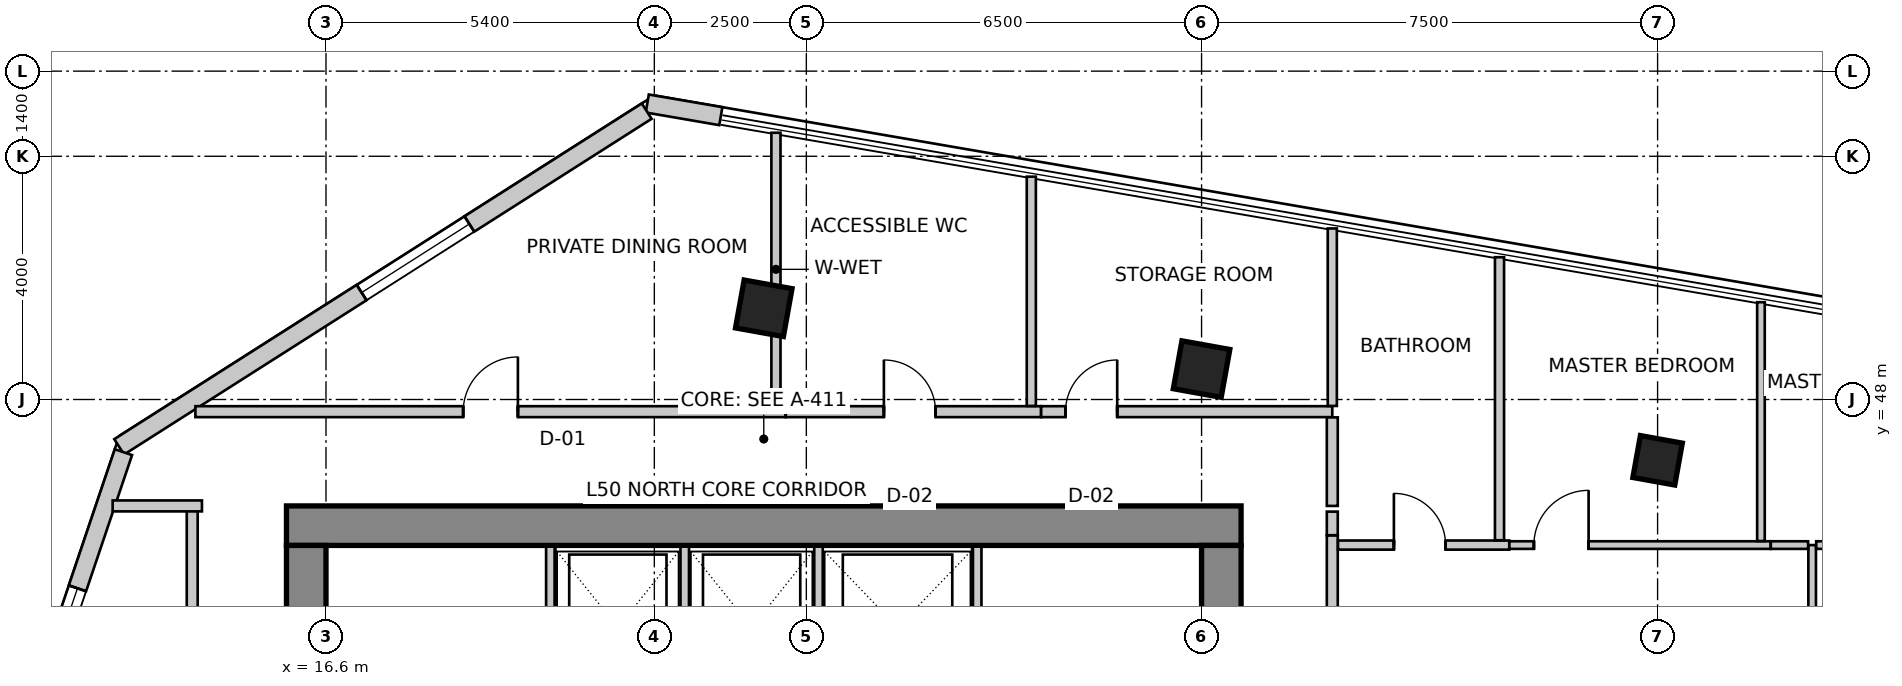
"""IFC4 building model, lengths in metres.
Left out: names, types, materials, properties, quantities, classifications, styles, units other than length and angle.
Written with IfcOpenShell. Run it as: python <this file> out.ifc"""

import sys

from ifc_helpers import new_model, si_unit, direction, frame, frame_2d, origin, origin_2d, place, context, subcontext, project, spatial, rectangle, extrude, source, transform, mapped, element, fill, save


model = new_model("IFC4")
c1 = context("Model", 3, precision=1e-05, world=origin(), true_north=direction((0.0, 1.0)))
c2 = subcontext(c1, "Body", "Model", "MODEL_VIEW")
j1 = project(units=[si_unit("LENGTHUNIT", "METRE"), si_unit("PLANEANGLEUNIT", "RADIAN")], contexts=[c1])
p1 = place(None, origin())
s1 = spatial("IfcSite", under=j1, at=p1, CompositionType="ELEMENT")
p2 = place(p1, origin())
s2 = spatial("IfcBuilding", under=s1, at=p2, CompositionType="ELEMENT")
p3 = place(p2, frame((0.0, 0.0, 200.9)))
s3 = spatial("IfcBuildingStorey", under=s2, at=p3, CompositionType="ELEMENT", Elevation=200.9)
p4 = place(p3, frame((15.95, 45.925, 0.0), z_axis=(0.0, 0.0, 1.0), x_axis=(1.0, 0.0, 0.0)))
e1 = element("IfcWall", 1, at=p4, inside=s3, PredefinedType="SHEAR", context=c2, shape_type="SweptSolid", body=[
    extrude(rectangle(XDim=15.7, YDim=0.65, at=frame_2d((7.85, 0.0))), origin(), (0.0, 0.0, 1.0), 3.5),
])
p5 = place(p3, frame((16.275, 34.2, 0.0), z_axis=(0.0, 0.0, 1.0), x_axis=(0.0, 1.0, 0.0)))
e2 = element("IfcWall", 2, at=p5, inside=s3, PredefinedType="SHEAR", context=c2, shape_type="SweptSolid", body=[
    extrude(rectangle(XDim=11.4, YDim=0.65, at=frame_2d((5.7, 0.0))), origin(), (0.0, 0.0, 1.0), 3.5),
])
m1 = source(origin(), c2, "Body", "SweptSolid", [
    extrude(rectangle(XDim=1.1, YDim=2.15, at=frame_2d((0.55, 1.075))), frame((0.0, 0.335, 0.0), z_axis=(0.0, -1.0, 0.0), x_axis=(1.0, 0.0, 0.0)), (0.0, 0.0, 1.0), 0.67),
])
p6 = place(p5, frame((7.15, 0.0, 0.0)))
e3 = element("IfcOpeningElement", 3, at=p6, cuts=e2, PredefinedType="OPENING", context=c2, shape_type="MappedRepresentation", body=[
    mapped(m1, transform((0.0, 0.0, 0.0), scale=1.0)),
])
p7 = place(p3, frame((31.325, 34.2, 0.0), z_axis=(0.0, 0.0, 1.0), x_axis=(0.0, 1.0, 0.0)))
e4 = element("IfcWall", 4, at=p7, inside=s3, PredefinedType="SHEAR", context=c2, shape_type="SweptSolid", body=[
    extrude(rectangle(XDim=11.4, YDim=0.65, at=frame_2d((5.7, 0.0))), origin(), (0.0, 0.0, 1.0), 3.5),
])
p8 = place(p7, frame((7.35, 0.0, 0.0)))
e5 = element("IfcOpeningElement", 5, at=p8, cuts=e4, PredefinedType="OPENING", context=c2, shape_type="MappedRepresentation", body=[
    mapped(m1, transform((0.0, 0.0, 0.0), scale=1.0)),
])
m2 = source(origin(), c2, "Body", "SweptSolid", [
    extrude(rectangle(XDim=0.8, YDim=0.8, at=origin_2d()), origin(), (0.0, 0.0, 1.0), 3.5),
])
for number, where, z_axis, x_axis in (
    (6, (23.8, 49.5, 0.0), (0.0, 0.0, 1.0), (0.984, -0.177, 0.0)),
    (7, (31.0, 48.5, 0.0), (0.0, 0.0, 1.0), (0.984, -0.177, 0.0)),
):
    element("IfcColumn", number, at=place(p3, frame(where, z_axis=z_axis, x_axis=x_axis)), inside=s3, PredefinedType="COLUMN", context=c2, shape_type="MappedRepresentation", body=[
        mapped(m2, transform((0.0, 0.0, 0.0), scale=1.0)),
    ])
m3 = source(origin(), c2, "Body", "SweptSolid", [
    extrude(rectangle(XDim=0.7, YDim=0.7, at=origin_2d()), origin(), (0.0, 0.0, 1.0), 3.5),
])
p9 = place(p3, frame((38.5, 47.0, 0.0), z_axis=(0.0, 0.0, 1.0), x_axis=(0.984195607969, -0.17708474032, 0.0)))
e8 = element("IfcColumn", 8, at=p9, inside=s3, PredefinedType="COLUMN", context=c2, shape_type="MappedRepresentation", body=[
    mapped(m3, transform((0.0, 0.0, 0.0), scale=1.0)),
])
p10 = place(p3, frame((23.094, 52.66, 0.0), z_axis=(0.0, 0.0, 1.0), x_axis=(-0.985503719785, 0.169653818966, 0.0)))
e9 = element("IfcWall", 9, at=p10, inside=s3, PredefinedType="SOLIDWALL", context=c2, shape_type="SweptSolid", body=[
    extrude(rectangle(XDim=1.228, YDim=0.3, at=frame_2d((0.614, 0.0))), origin(), (0.0, 0.0, 1.0), 3.25),
])
p11 = place(p3, frame((21.875, 52.742, 0.0), z_axis=(0.0, 0.0, 1.0), x_axis=(-0.843666375448, -0.536867811419, 0.0)))
e10 = element("IfcWall", 10, at=p11, inside=s3, PredefinedType="SOLIDWALL", context=c2, shape_type="SweptSolid", body=[
    extrude(rectangle(XDim=10.284, YDim=0.3, at=frame_2d((5.142, 0.0))), origin(), (0.0, 0.0, 1.0), 3.25),
])
m4 = source(origin(), c2, "Body", "SweptSolid", [
    extrude(rectangle(XDim=2.1, YDim=2.0, at=frame_2d((1.05, 1.0))), frame((0.0, 0.16, 0.0), z_axis=(0.0, -1.0, 0.0), x_axis=(1.0, 0.0, 0.0)), (0.0, 0.0, 1.0), 0.32),
])
p12 = place(p11, frame((3.457, 0.0, 0.85)))
e11 = element("IfcOpeningElement", 11, at=p12, cuts=e10, PredefinedType="OPENING", context=c2, shape_type="MappedRepresentation", body=[
    mapped(m4, transform((0.0, 0.0, 0.0), scale=1.0)),
])
p13 = place(p3, frame((13.269, 47.134, 0.0), z_axis=(0.0, 0.0, 1.0), x_axis=(-0.319920776449, -0.947444297464, 0.0)))
e12 = element("IfcWall", 12, at=p13, inside=s3, PredefinedType="SOLIDWALL", context=c2, shape_type="SweptSolid", body=[
    extrude(rectangle(XDim=16.133, YDim=0.3, at=frame_2d((8.067, 0.0))), origin(), (0.0, 0.0, 1.0), 3.25),
])
m5 = source(origin(), c2, "Body", "SweptSolid", [
    extrude(rectangle(XDim=2.4, YDim=2.2, at=frame_2d((1.2, 1.1))), frame((0.0, 0.16, 0.0), z_axis=(0.0, -1.0, 0.0), x_axis=(1.0, 0.0, 0.0)), (0.0, 0.0, 1.0), 0.32),
])
p14 = place(p13, frame((2.363, 0.0, 0.85)))
e13 = element("IfcOpeningElement", 13, at=p14, cuts=e12, PredefinedType="OPENING", context=c2, shape_type="MappedRepresentation", body=[
    mapped(m5, transform((0.0, 0.0, 0.0), scale=1.0)),
])
p15 = place(p13, frame((7.41, 0.0, 0.85)))
e14 = element("IfcOpeningElement", 14, at=p15, cuts=e12, PredefinedType="OPENING", context=c2, shape_type="MappedRepresentation", body=[
    mapped(m4, transform((0.0, 0.0, 0.0), scale=1.0)),
])
p16 = place(p13, frame((12.157, 0.0, 0.85)))
e15 = element("IfcOpeningElement", 15, at=p16, cuts=e12, PredefinedType="OPENING", context=c2, shape_type="MappedRepresentation", body=[
    mapped(m5, transform((0.0, 0.0, 0.0), scale=1.0)),
])
for number, where, z_axis, x_axis in (
    (16, (20.29, 43.28, 0.0), (0.0, 0.0, 1.0), (0.0, 1.0, 0.0)),
    (17, (27.31, 43.28, 0.0), (0.0, 0.0, 1.0), (0.0, 1.0, 0.0)),
):
    element("IfcWall", number, at=place(p3, frame(where, z_axis=z_axis, x_axis=x_axis)), inside=s3, PredefinedType="SOLIDWALL", context=c2, shape_type="SweptSolid", body=[
        extrude(rectangle(XDim=2.3, YDim=0.14, at=frame_2d((1.15, 0.0))), origin(), (0.0, 0.0, 1.0), 3.25),
    ])
for number, where, z_axis, x_axis in (
    (18, (22.5, 43.02, 0.0), (0.0, 0.0, 1.0), (0.0, 1.0, 0.0)),
    (19, (24.7, 43.02, 0.0), (0.0, 0.0, 1.0), (0.0, 1.0, 0.0)),
):
    element("IfcWall", number, at=place(p3, frame(where, z_axis=z_axis, x_axis=x_axis)), inside=s3, PredefinedType="SOLIDWALL", context=c2, shape_type="SweptSolid", body=[
        extrude(rectangle(XDim=2.56, YDim=0.14, at=frame_2d((1.28, 0.0))), origin(), (0.0, 0.0, 1.0), 3.25),
    ])
p17 = place(p3, frame((14.4, 33.644, 0.0), z_axis=(0.0, 0.0, 1.0), x_axis=(0.0, 1.0, 0.0)))
e20 = element("IfcWall", 20, at=p17, inside=s3, PredefinedType="PARTITIONING", context=c2, shape_type="SweptSolid", body=[
    extrude(rectangle(XDim=12.606, YDim=0.18, at=frame_2d((6.303, 0.0))), origin(), (0.0, 0.0, 1.0), 3.25),
])
m6 = source(origin(), c2, "Body", "SweptSolid", [
    extrude(rectangle(XDim=0.9, YDim=2.15, at=frame_2d((0.45, 1.075))), frame((0.0, 0.1, 0.0), z_axis=(0.0, -1.0, 0.0), x_axis=(1.0, 0.0, 0.0)), (0.0, 0.0, 1.0), 0.2),
])
p18 = place(p17, frame((4.399, 0.0, 0.0)))
e21 = element("IfcOpeningElement", 21, at=p18, cuts=e20, PredefinedType="OPENING", context=c2, shape_type="MappedRepresentation", body=[
    mapped(m6, transform((0.0, 0.0, 0.0), scale=1.0)),
])
p19 = place(p3, frame((14.56, 46.25, 0.0), z_axis=(0.0, 0.0, 1.0), x_axis=(-1.0, 0.0, 0.0)))
e22 = element("IfcWall", 22, at=p19, inside=s3, PredefinedType="PARTITIONING", context=c2, shape_type="SweptSolid", body=[
    extrude(rectangle(XDim=1.469, YDim=0.18, at=frame_2d((0.734, 0.0))), origin(), (0.0, 0.0, 1.0), 3.25),
])
p20 = place(p3, frame((14.453, 47.8, 0.0), z_axis=(0.0, 0.0, 1.0), x_axis=(1.0, 0.0, 0.0)))
e23 = element("IfcWall", 23, at=p20, inside=s3, PredefinedType="PARTITIONING", context=c2, shape_type="SweptSolid", body=[
    extrude(rectangle(XDim=9.707, YDim=0.18, at=frame_2d((4.854, 0.0))), origin(), (0.0, 0.0, 1.0), 2.934),
])
p21 = place(p20, frame((4.404, 0.0, 0.0)))
e24 = element("IfcOpeningElement", 24, at=p21, cuts=e23, PredefinedType="OPENING", context=c2, shape_type="MappedRepresentation", body=[
    mapped(m6, transform((0.0, 0.0, 0.0), scale=1.0)),
])
p22 = place(p3, frame((24.162, 47.8, 0.0), z_axis=(0.0, 0.0, 1.0), x_axis=(1.0, 0.0, 0.0)))
e25 = element("IfcWall", 25, at=p22, inside=s3, PredefinedType="PARTITIONING", context=c2, shape_type="SweptSolid", body=[
    extrude(rectangle(XDim=4.198, YDim=0.18, at=frame_2d((2.099, 0.0))), origin(), (0.0, 0.0, 1.0), 3.25),
])
m7 = source(origin(), c2, "Body", "SweptSolid", [
    extrude(rectangle(XDim=0.85, YDim=2.15, at=frame_2d((0.425, 1.075))), frame((0.0, 0.1, 0.0), z_axis=(0.0, -1.0, 0.0), x_axis=(1.0, 0.0, 0.0)), (0.0, 0.0, 1.0), 0.2),
])
p23 = place(p22, frame((1.613, 0.0, 0.0)))
e26 = element("IfcOpeningElement", 26, at=p23, cuts=e25, PredefinedType="OPENING", context=c2, shape_type="MappedRepresentation", body=[
    mapped(m7, transform((0.0, 0.0, 0.0), scale=1.0)),
])
p24 = place(p3, frame((28.362, 47.8, 0.0), z_axis=(0.0, 0.0, 1.0), x_axis=(1.0, 0.0, 0.0)))
e27 = element("IfcWall", 27, at=p24, inside=s3, PredefinedType="PARTITIONING", context=c2, shape_type="SweptSolid", body=[
    extrude(rectangle(XDim=4.788, YDim=0.18, at=frame_2d((2.394, 0.0))), origin(), (0.0, 0.0, 1.0), 2.822),
])
p25 = place(p24, frame((0.401, 0.0, 0.0)))
e28 = element("IfcOpeningElement", 28, at=p25, cuts=e27, PredefinedType="OPENING", context=c2, shape_type="MappedRepresentation", body=[
    mapped(m7, transform((0.0, 0.0, 0.0), scale=1.0)),
])
p26 = place(p3, frame((33.15, 47.706, 0.0), z_axis=(0.0, 0.0, 1.0), x_axis=(0.0, -1.0, 0.0)))
e29 = element("IfcWall", 29, at=p26, inside=s3, PredefinedType="PARTITIONING", context=c2, shape_type="SweptSolid", body=[
    extrude(rectangle(XDim=1.456, YDim=0.18, at=frame_2d((0.728, 0.0))), origin(), (0.0, 0.0, 1.0), 2.822),
])
p27 = place(p3, frame((33.15, 45.766, 0.0), z_axis=(0.0, 0.0, 1.0), x_axis=(0.0, -1.0, 0.0)))
e30 = element("IfcWall", 30, at=p27, inside=s3, PredefinedType="PARTITIONING", context=c2, shape_type="SweptSolid", body=[
    extrude(rectangle(XDim=5.526, YDim=0.18, at=frame_2d((2.763, 0.0))), origin(), (0.0, 0.0, 1.0), 2.822),
])
p28 = place(p3, frame((33.15, 46.156, 0.0), z_axis=(0.0, 0.0, 1.0), x_axis=(0.0, -1.0, 0.0)))
e31 = element("IfcWall", 31, at=p28, inside=s3, PredefinedType="PARTITIONING", context=c2, shape_type="SweptSolid", body=[
    extrude(rectangle(XDim=0.388, YDim=0.18, at=frame_2d((0.194, 0.0))), origin(), (0.0, 0.0, 1.0), 2.934),
])
p29 = place(p3, frame((24.0, 52.387, 0.0), z_axis=(0.0, 0.0, 1.0), x_axis=(0.0, -1.0, 0.0)))
e32 = element("IfcWall", 32, at=p29, inside=s3, PredefinedType="PARTITIONING", context=c2, shape_type="SweptSolid", body=[
    extrude(rectangle(XDim=4.493, YDim=0.15, at=frame_2d((2.247, 0.0))), origin(), (0.0, 0.0, 1.0), 2.542),
])
p30 = place(p3, frame((28.2, 51.665, 0.0), z_axis=(0.0, 0.0, 1.0), x_axis=(0.0, -1.0, 0.0)))
e33 = element("IfcWall", 33, at=p30, inside=s3, PredefinedType="PARTITIONING", context=c2, shape_type="SweptSolid", body=[
    extrude(rectangle(XDim=3.771, YDim=0.15, at=frame_2d((1.885, 0.0))), origin(), (0.0, 0.0, 1.0), 2.542),
])
p31 = place(p3, frame((33.15, 50.813, 0.0), z_axis=(0.0, 0.0, 1.0), x_axis=(0.0, -1.0, 0.0)))
e34 = element("IfcWall", 34, at=p31, inside=s3, PredefinedType="PARTITIONING", context=c2, shape_type="SweptSolid", body=[
    extrude(rectangle(XDim=2.919, YDim=0.15, at=frame_2d((1.459, 0.0))), origin(), (0.0, 0.0, 1.0), 2.542),
])
p32 = place(p3, frame((41.042, 45.606, 0.0), z_axis=(0.0, 0.0, 1.0), x_axis=(0.0, -1.0, 0.0)))
e35 = element("IfcWall", 35, at=p32, inside=s3, PredefinedType="PARTITIONING", context=c2, shape_type="SweptSolid", body=[
    extrude(rectangle(XDim=5.112, YDim=0.125, at=frame_2d((2.556, 0.0))), origin(), (0.0, 0.0, 1.0), 2.822),
])
m8 = source(origin(), c2, "Body", "SweptSolid", [
    extrude(rectangle(XDim=0.85, YDim=2.15, at=frame_2d((0.425, 1.075))), frame((0.0, 0.073, 0.0), z_axis=(0.0, -1.0, 0.0), x_axis=(1.0, 0.0, 0.0)), (0.0, 0.0, 1.0), 0.145),
])
p33 = place(p32, frame((2.131, 0.0, 0.0)))
e36 = element("IfcOpeningElement", 36, at=p33, cuts=e35, PredefinedType="OPENING", context=c2, shape_type="MappedRepresentation", body=[
    mapped(m8, transform((0.0, 0.0, 0.0), scale=1.0)),
])
p34 = place(p3, frame((33.244, 45.606, 0.0), z_axis=(0.0, 0.0, 1.0), x_axis=(1.0, 0.0, 0.0)))
e37 = element("IfcWall", 37, at=p34, inside=s3, PredefinedType="PARTITIONING", context=c2, shape_type="SweptSolid", body=[
    extrude(rectangle(XDim=2.816, YDim=0.15, at=frame_2d((1.408, 0.0))), origin(), (0.0, 0.0, 1.0), 2.822),
])
m9 = source(origin(), c2, "Body", "SweptSolid", [
    extrude(rectangle(XDim=0.85, YDim=2.15, at=frame_2d((0.425, 1.075))), frame((0.0, 0.085, 0.0), z_axis=(0.0, -1.0, 0.0), x_axis=(1.0, 0.0, 0.0)), (0.0, 0.0, 1.0), 0.17),
])
p35 = place(p34, frame((0.919, 0.0, 0.0)))
e38 = element("IfcOpeningElement", 38, at=p35, cuts=e37, PredefinedType="OPENING", context=c2, shape_type="MappedRepresentation", body=[
    mapped(m9, transform((0.0, 0.0, 0.0), scale=1.0)),
])
p36 = place(p3, frame((36.062, 45.606, 0.0), z_axis=(0.0, 0.0, 1.0), x_axis=(1.0, 0.0, 0.0)))
e39 = element("IfcWall", 39, at=p36, inside=s3, PredefinedType="PARTITIONING", context=c2, shape_type="SweptSolid", body=[
    extrude(rectangle(XDim=4.298, YDim=0.125, at=frame_2d((2.149, 0.0))), origin(), (0.0, 0.0, 1.0), 2.766),
])
m10 = source(origin(), c2, "Body", "SweptSolid", [
    extrude(rectangle(XDim=0.9, YDim=2.15, at=frame_2d((0.45, 1.075))), frame((0.0, 0.073, 0.0), z_axis=(0.0, -1.0, 0.0), x_axis=(1.0, 0.0, 0.0)), (0.0, 0.0, 1.0), 0.145),
])
p37 = place(p36, frame((0.403, 0.0, 0.0)))
e40 = element("IfcOpeningElement", 40, at=p37, cuts=e39, PredefinedType="OPENING", context=c2, shape_type="MappedRepresentation", body=[
    mapped(m10, transform((0.0, 0.0, 0.0), scale=1.0)),
])
p38 = place(p3, frame((40.362, 45.606, 0.0), z_axis=(0.0, 0.0, 1.0), x_axis=(1.0, 0.0, 0.0)))
e41 = element("IfcWall", 41, at=p38, inside=s3, PredefinedType="PARTITIONING", context=c2, shape_type="SweptSolid", body=[
    extrude(rectangle(XDim=0.614, YDim=0.125, at=frame_2d((0.307, 0.0))), origin(), (0.0, 0.0, 1.0), 3.25),
])
p39 = place(p3, frame((41.108, 45.606, 0.0), z_axis=(0.0, 0.0, 1.0), x_axis=(1.0, 0.0, 0.0)))
e42 = element("IfcWall", 42, at=p39, inside=s3, PredefinedType="PARTITIONING", context=c2, shape_type="SweptSolid", body=[
    extrude(rectangle(XDim=3.392, YDim=0.125, at=frame_2d((1.696, 0.0))), origin(), (0.0, 0.0, 1.0), 3.25),
])
p40 = place(p39, frame((1.246, 0.0, 0.0)))
e43 = element("IfcOpeningElement", 43, at=p40, cuts=e42, PredefinedType="OPENING", context=c2, shape_type="MappedRepresentation", body=[
    mapped(m10, transform((0.0, 0.0, 0.0), scale=1.0)),
])
p41 = place(p3, frame((35.9, 50.34, 0.0), z_axis=(0.0, 0.0, 1.0), x_axis=(0.0, -1.0, 0.0)))
e44 = element("IfcWall", 44, at=p41, inside=s3, PredefinedType="PARTITIONING", context=c2, shape_type="SweptSolid", body=[
    extrude(rectangle(XDim=4.655, YDim=0.15, at=frame_2d((2.327, 0.0))), origin(), (0.0, 0.0, 1.0), 2.542),
])
p42 = place(p3, frame((40.2, 49.6, 0.0), z_axis=(0.0, 0.0, 1.0), x_axis=(0.0, -1.0, 0.0)))
e45 = element("IfcWall", 45, at=p42, inside=s3, PredefinedType="PARTITIONING", context=c2, shape_type="SweptSolid", body=[
    extrude(rectangle(XDim=3.927, YDim=0.125, at=frame_2d((1.964, 0.0))), origin(), (0.0, 0.0, 1.0), 2.542),
])
m11 = source(origin(), c2, "Body", "SweptSolid", [
    extrude(rectangle(XDim=2.1, YDim=2.0, at=frame_2d((1.05, 1.0))), frame((0.0, -0.015, 0.0), z_axis=(0.0, -1.0, 0.0), x_axis=(1.0, 0.0, 0.0)), (0.0, 0.0, 1.0), 0.06),
])
p43 = place(p12, origin())
e46 = element("IfcWindow", 46, at=p43, inside=s3, PartitioningType="SINGLE_PANEL", PredefinedType="WINDOW", context=c2, shape_type="MappedRepresentation", body=[
    mapped(m11, transform((0.0, 0.0, 0.0), scale=1.0)),
])
fill(e11, e46)
m12 = source(origin(), c2, "Body", "SweptSolid", [
    extrude(rectangle(XDim=2.4, YDim=2.2, at=frame_2d((1.2, 1.1))), frame((0.0, -0.015, 0.0), z_axis=(0.0, -1.0, 0.0), x_axis=(1.0, 0.0, 0.0)), (0.0, 0.0, 1.0), 0.06),
])
p44 = place(p14, origin())
e47 = element("IfcWindow", 47, at=p44, inside=s3, PartitioningType="SINGLE_PANEL", PredefinedType="WINDOW", context=c2, shape_type="MappedRepresentation", body=[
    mapped(m12, transform((0.0, 0.0, 0.0), scale=1.0)),
])
fill(e13, e47)
m13 = source(origin(), c2, "Body", "SweptSolid", [
    extrude(rectangle(XDim=0.9, YDim=2.15, at=frame_2d((0.45, 1.075))), frame((0.0, 0.025, 0.0), z_axis=(0.0, -1.0, 0.0), x_axis=(1.0, 0.0, 0.0)), (0.0, 0.0, 1.0), 0.05),
])
p45 = place(p21, origin())
e48 = element("IfcDoor", 48, at=p45, inside=s3, OperationType="SINGLE_SWING_RIGHT", PredefinedType="DOOR", context=c2, shape_type="MappedRepresentation", body=[
    mapped(m13, transform((0.0, 0.0, 0.0), scale=1.0)),
])
fill(e24, e48)
m14 = source(origin(), c2, "Body", "SweptSolid", [
    extrude(rectangle(XDim=0.85, YDim=2.15, at=frame_2d((0.425, 1.075))), frame((0.0, 0.025, 0.0), z_axis=(0.0, -1.0, 0.0), x_axis=(1.0, 0.0, 0.0)), (0.0, 0.0, 1.0), 0.05),
])
p46 = place(p23, origin())
e49 = element("IfcDoor", 49, at=p46, inside=s3, OperationType="SINGLE_SWING_LEFT", PredefinedType="DOOR", context=c2, shape_type="MappedRepresentation", body=[
    mapped(m14, transform((0.0, 0.0, 0.0), scale=1.0)),
])
fill(e26, e49)
p47 = place(p25, origin())
e50 = element("IfcDoor", 50, at=p47, inside=s3, OperationType="SINGLE_SWING_RIGHT", PredefinedType="DOOR", context=c2, shape_type="MappedRepresentation", body=[
    mapped(m14, transform((0.0, 0.0, 0.0), scale=1.0)),
])
fill(e28, e50)
p48 = place(p35, origin())
e51 = element("IfcDoor", 51, at=p48, inside=s3, OperationType="SINGLE_SWING_LEFT", PredefinedType="DOOR", context=c2, shape_type="MappedRepresentation", body=[
    mapped(m14, transform((0.0, 0.0, 0.0), scale=1.0)),
])
fill(e38, e51)
p49 = place(p37, origin())
e52 = element("IfcDoor", 52, at=p49, inside=s3, OperationType="SINGLE_SWING_RIGHT", PredefinedType="DOOR", context=c2, shape_type="MappedRepresentation", body=[
    mapped(m13, transform((0.0, 0.0, 0.0), scale=1.0)),
])
fill(e40, e52)
save(model, sys.argv[1])
